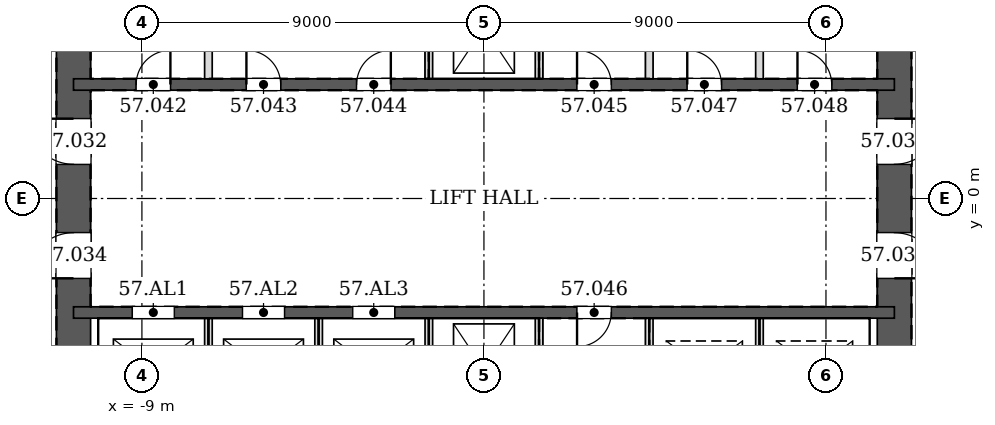
"""IFC4 building model, lengths in metres.
Left out: names, types, materials, properties, quantities, classifications, styles, units other than length and angle.
Written with IfcOpenShell. Run it as: python <this file> out.ifc"""

import sys

from ifc_helpers import new_model, si_unit, direction, frame, frame_2d, origin, place, context, subcontext, project, spatial, rectangle, extrude, element, fill, save


model = new_model("IFC4")
c1 = context("Model", 3, precision=1e-05, world=origin(), true_north=direction((0.0, 1.0)))
c2 = subcontext(c1, "Body", "Model", "MODEL_VIEW")
j1 = project(units=[si_unit("LENGTHUNIT", "METRE"), si_unit("PLANEANGLEUNIT", "RADIAN")], contexts=[c1])
p1 = place(None, origin())
s1 = spatial("IfcSite", under=j1, at=p1, CompositionType="ELEMENT")
p2 = place(p1, origin())
s2 = spatial("IfcBuilding", under=s1, at=p2, CompositionType="ELEMENT")
p3 = place(p2, frame((0.0, 0.0, 241.4)))
s3 = spatial("IfcBuildingStorey", under=s2, at=p3, CompositionType="ELEMENT", Elevation=241.4)
p4 = place(p3, frame((10.8, -10.8, 0.0), z_axis=(0.0, 0.0, 1.0), x_axis=(0.0, 1.0, 0.0)))
e1 = element("IfcWall", 1, at=p4, inside=s3, PredefinedType="SOLIDWALL", context=c2, shape_type="SweptSolid", body=[
    extrude(rectangle(XDim=21.6, YDim=0.9, at=frame_2d((10.8, 0.0))), origin(), (0.0, 0.0, 1.0), 3.4),
])
p5 = place(p4, frame((11.7, 0.0, 0.0)))
e2 = element("IfcOpeningElement", 2, at=p5, cuts=e1, PredefinedType="OPENING", context=c2, shape_type="SweptSolid", body=[
    extrude(rectangle(XDim=1.2, YDim=2.1, at=frame_2d((0.6, 1.05))), frame((0.0, 0.46, 0.0), z_axis=(0.0, -1.0, 0.0), x_axis=(1.0, 0.0, 0.0)), (0.0, 0.0, 1.0), 0.92),
])
p6 = place(p4, frame((8.7, 0.0, 0.0)))
e3 = element("IfcOpeningElement", 3, at=p6, cuts=e1, PredefinedType="OPENING", context=c2, shape_type="SweptSolid", body=[
    extrude(rectangle(XDim=1.2, YDim=2.1, at=frame_2d((0.6, 1.05))), frame((0.0, 0.46, 0.0), z_axis=(0.0, -1.0, 0.0), x_axis=(1.0, 0.0, 0.0)), (0.0, 0.0, 1.0), 0.92),
])
p7 = place(p3, frame((-10.8, 10.8, 0.0), z_axis=(0.0, 0.0, 1.0), x_axis=(0.0, -1.0, 0.0)))
e4 = element("IfcWall", 4, at=p7, inside=s3, PredefinedType="SOLIDWALL", context=c2, shape_type="SweptSolid", body=[
    extrude(rectangle(XDim=21.6, YDim=0.9, at=frame_2d((10.8, 0.0))), origin(), (0.0, 0.0, 1.0), 3.4),
])
p8 = place(p7, frame((8.7, 0.0, 0.0)))
e5 = element("IfcOpeningElement", 5, at=p8, cuts=e4, PredefinedType="OPENING", context=c2, shape_type="SweptSolid", body=[
    extrude(rectangle(XDim=1.2, YDim=2.1, at=frame_2d((0.6, 1.05))), frame((0.0, 0.46, 0.0), z_axis=(0.0, -1.0, 0.0), x_axis=(1.0, 0.0, 0.0)), (0.0, 0.0, 1.0), 0.92),
])
p9 = place(p7, frame((11.7, 0.0, 0.0)))
e6 = element("IfcOpeningElement", 6, at=p9, cuts=e4, PredefinedType="OPENING", context=c2, shape_type="SweptSolid", body=[
    extrude(rectangle(XDim=1.2, YDim=2.1, at=frame_2d((0.6, 1.05))), frame((0.0, 0.46, 0.0), z_axis=(0.0, -1.0, 0.0), x_axis=(1.0, 0.0, 0.0)), (0.0, 0.0, 1.0), 0.92),
])
p10 = place(p3, frame((-10.8, 3.0, 0.0), z_axis=(0.0, 0.0, 1.0), x_axis=(1.0, 0.0, 0.0)))
e7 = element("IfcWall", 7, at=p10, inside=s3, PredefinedType="SOLIDWALL", context=c2, shape_type="SweptSolid", body=[
    extrude(rectangle(XDim=21.6, YDim=0.3, at=frame_2d((10.8, 0.0))), origin(), (0.0, 0.0, 1.0), 3.4),
])
p11 = place(p10, frame((1.65, 0.0, 0.0)))
e8 = element("IfcOpeningElement", 8, at=p11, cuts=e7, PredefinedType="OPENING", context=c2, shape_type="SweptSolid", body=[
    extrude(rectangle(XDim=0.9, YDim=2.1, at=frame_2d((0.45, 1.05))), frame((0.0, 0.16, 0.0), z_axis=(0.0, -1.0, 0.0), x_axis=(1.0, 0.0, 0.0)), (0.0, 0.0, 1.0), 0.32),
])
p12 = place(p10, frame((4.55, 0.0, 0.0)))
e9 = element("IfcOpeningElement", 9, at=p12, cuts=e7, PredefinedType="OPENING", context=c2, shape_type="SweptSolid", body=[
    extrude(rectangle(XDim=0.9, YDim=2.1, at=frame_2d((0.45, 1.05))), frame((0.0, 0.16, 0.0), z_axis=(0.0, -1.0, 0.0), x_axis=(1.0, 0.0, 0.0)), (0.0, 0.0, 1.0), 0.32),
])
p13 = place(p10, frame((7.45, 0.0, 0.0)))
e10 = element("IfcOpeningElement", 10, at=p13, cuts=e7, PredefinedType="OPENING", context=c2, shape_type="SweptSolid", body=[
    extrude(rectangle(XDim=0.9, YDim=2.1, at=frame_2d((0.45, 1.05))), frame((0.0, 0.16, 0.0), z_axis=(0.0, -1.0, 0.0), x_axis=(1.0, 0.0, 0.0)), (0.0, 0.0, 1.0), 0.32),
])
p14 = place(p10, frame((13.25, 0.0, 0.0)))
e11 = element("IfcOpeningElement", 11, at=p14, cuts=e7, PredefinedType="OPENING", context=c2, shape_type="SweptSolid", body=[
    extrude(rectangle(XDim=0.9, YDim=2.1, at=frame_2d((0.45, 1.05))), frame((0.0, 0.16, 0.0), z_axis=(0.0, -1.0, 0.0), x_axis=(1.0, 0.0, 0.0)), (0.0, 0.0, 1.0), 0.32),
])
p15 = place(p10, frame((16.15, 0.0, 0.0)))
e12 = element("IfcOpeningElement", 12, at=p15, cuts=e7, PredefinedType="OPENING", context=c2, shape_type="SweptSolid", body=[
    extrude(rectangle(XDim=0.9, YDim=2.1, at=frame_2d((0.45, 1.05))), frame((0.0, 0.16, 0.0), z_axis=(0.0, -1.0, 0.0), x_axis=(1.0, 0.0, 0.0)), (0.0, 0.0, 1.0), 0.32),
])
p16 = place(p10, frame((19.05, 0.0, 0.0)))
e13 = element("IfcOpeningElement", 13, at=p16, cuts=e7, PredefinedType="OPENING", context=c2, shape_type="SweptSolid", body=[
    extrude(rectangle(XDim=0.9, YDim=2.1, at=frame_2d((0.45, 1.05))), frame((0.0, 0.16, 0.0), z_axis=(0.0, -1.0, 0.0), x_axis=(1.0, 0.0, 0.0)), (0.0, 0.0, 1.0), 0.32),
])
p17 = place(p3, frame((-10.8, -3.0, 0.0), z_axis=(0.0, 0.0, 1.0), x_axis=(1.0, 0.0, 0.0)))
e14 = element("IfcWall", 14, at=p17, inside=s3, PredefinedType="SOLIDWALL", context=c2, shape_type="SweptSolid", body=[
    extrude(rectangle(XDim=21.6, YDim=0.3, at=frame_2d((10.8, 0.0))), origin(), (0.0, 0.0, 1.0), 3.4),
])
p18 = place(p17, frame((13.25, 0.0, 0.0)))
e15 = element("IfcOpeningElement", 15, at=p18, cuts=e14, PredefinedType="OPENING", context=c2, shape_type="SweptSolid", body=[
    extrude(rectangle(XDim=0.9, YDim=2.1, at=frame_2d((0.45, 1.05))), frame((0.0, 0.16, 0.0), z_axis=(0.0, -1.0, 0.0), x_axis=(1.0, 0.0, 0.0)), (0.0, 0.0, 1.0), 0.32),
])
p19 = place(p17, frame((1.55, 0.0, 0.0)))
e16 = element("IfcOpeningElement", 16, at=p19, cuts=e14, PredefinedType="OPENING", context=c2, shape_type="SweptSolid", body=[
    extrude(rectangle(XDim=1.1, YDim=2.1, at=frame_2d((0.55, 1.05))), frame((0.0, 0.16, 0.0), z_axis=(0.0, -1.0, 0.0), x_axis=(1.0, 0.0, 0.0)), (0.0, 0.0, 1.0), 0.32),
])
p20 = place(p17, frame((4.45, 0.0, 0.0)))
e17 = element("IfcOpeningElement", 17, at=p20, cuts=e14, PredefinedType="OPENING", context=c2, shape_type="SweptSolid", body=[
    extrude(rectangle(XDim=1.1, YDim=2.1, at=frame_2d((0.55, 1.05))), frame((0.0, 0.16, 0.0), z_axis=(0.0, -1.0, 0.0), x_axis=(1.0, 0.0, 0.0)), (0.0, 0.0, 1.0), 0.32),
])
p21 = place(p17, frame((7.35, 0.0, 0.0)))
e18 = element("IfcOpeningElement", 18, at=p21, cuts=e14, PredefinedType="OPENING", context=c2, shape_type="SweptSolid", body=[
    extrude(rectangle(XDim=1.1, YDim=2.1, at=frame_2d((0.55, 1.05))), frame((0.0, 0.16, 0.0), z_axis=(0.0, -1.0, 0.0), x_axis=(1.0, 0.0, 0.0)), (0.0, 0.0, 1.0), 0.32),
])
for number, where, z_axis, x_axis in (
    (19, (-7.25, 3.15, 0.0), (0.0, 0.0, 1.0), (0.0, 1.0, 0.0)),
    (20, (-1.45, 3.15, 0.0), (0.0, 0.0, 1.0), (0.0, 1.0, 0.0)),
    (21, (1.45, 3.15, 0.0), (0.0, 0.0, 1.0), (0.0, 1.0, 0.0)),
    (22, (4.35, 3.15, 0.0), (0.0, 0.0, 1.0), (0.0, 1.0, 0.0)),
    (23, (7.25, 3.15, 0.0), (0.0, 0.0, 1.0), (0.0, 1.0, 0.0)),
):
    element("IfcWall", number, at=place(p3, frame(where, z_axis=z_axis, x_axis=x_axis)), inside=s3, PredefinedType="PARTITIONING", context=c2, shape_type="SweptSolid", body=[
        extrude(rectangle(XDim=2.7, YDim=0.2, at=frame_2d((1.35, 0.0))), origin(), (0.0, 0.0, 1.0), 3.2),
    ])
for number, where, z_axis, x_axis in (
    (24, (-7.25, -5.85, 0.0), (0.0, 0.0, 1.0), (0.0, 1.0, 0.0)),
    (25, (-4.35, -5.85, 0.0), (0.0, 0.0, 1.0), (0.0, 1.0, 0.0)),
    (26, (-1.45, -5.85, 0.0), (0.0, 0.0, 1.0), (0.0, 1.0, 0.0)),
):
    element("IfcWall", number, at=place(p3, frame(where, z_axis=z_axis, x_axis=x_axis)), inside=s3, PredefinedType="PARTITIONING", context=c2, shape_type="SweptSolid", body=[
        extrude(rectangle(XDim=2.7, YDim=0.2, at=frame_2d((1.35, 0.0))), origin(), (0.0, 0.0, 1.0), 3.4),
    ])
for number, where, z_axis, x_axis in (
    (27, (1.45, -5.85, 0.0), (0.0, 0.0, 1.0), (0.0, 1.0, 0.0)),
    (28, (4.35, -5.85, 0.0), (0.0, 0.0, 1.0), (0.0, 1.0, 0.0)),
):
    element("IfcWall", number, at=place(p3, frame(where, z_axis=z_axis, x_axis=x_axis)), inside=s3, PredefinedType="PARTITIONING", context=c2, shape_type="SweptSolid", body=[
        extrude(rectangle(XDim=2.7, YDim=0.2, at=frame_2d((1.35, 0.0))), origin(), (0.0, 0.0, 1.0), 3.2),
    ])
p22 = place(p3, frame((7.25, -5.85, 0.0), z_axis=(0.0, 0.0, 1.0), x_axis=(0.0, 1.0, 0.0)))
e29 = element("IfcWall", 29, at=p22, inside=s3, PredefinedType="PARTITIONING", context=c2, shape_type="SweptSolid", body=[
    extrude(rectangle(XDim=2.7, YDim=0.2, at=frame_2d((1.35, 0.0))), origin(), (0.0, 0.0, 1.0), 3.4),
])
p23 = place(p5, frame((1.2, 0.0, 0.0), z_axis=(0.0, 0.0, 1.0), x_axis=(-1.0, 0.0, 0.0)))
e30 = element("IfcDoor", 30, at=p23, inside=s3, OperationType="SINGLE_SWING_LEFT", PredefinedType="DOOR", context=c2, shape_type="SweptSolid", body=[
    extrude(rectangle(XDim=1.2, YDim=2.1, at=frame_2d((0.6, 1.05))), frame((0.0, 0.025, 0.0), z_axis=(0.0, -1.0, 0.0), x_axis=(1.0, 0.0, 0.0)), (0.0, 0.0, 1.0), 0.05),
])
fill(e2, e30)
p24 = place(p8, frame((1.2, 0.0, 0.0), z_axis=(0.0, 0.0, 1.0), x_axis=(-1.0, 0.0, 0.0)))
e31 = element("IfcDoor", 31, at=p24, inside=s3, OperationType="SINGLE_SWING_RIGHT", PredefinedType="DOOR", context=c2, shape_type="SweptSolid", body=[
    extrude(rectangle(XDim=1.2, YDim=2.1, at=frame_2d((0.6, 1.05))), frame((0.0, 0.025, 0.0), z_axis=(0.0, -1.0, 0.0), x_axis=(1.0, 0.0, 0.0)), (0.0, 0.0, 1.0), 0.05),
])
fill(e5, e31)
p25 = place(p6, frame((1.2, 0.0, 0.0), z_axis=(0.0, 0.0, 1.0), x_axis=(-1.0, 0.0, 0.0)))
e32 = element("IfcDoor", 32, at=p25, inside=s3, OperationType="SINGLE_SWING_RIGHT", PredefinedType="DOOR", context=c2, shape_type="SweptSolid", body=[
    extrude(rectangle(XDim=1.2, YDim=2.1, at=frame_2d((0.6, 1.05))), frame((0.0, 0.025, 0.0), z_axis=(0.0, -1.0, 0.0), x_axis=(1.0, 0.0, 0.0)), (0.0, 0.0, 1.0), 0.05),
])
fill(e3, e32)
p26 = place(p9, frame((1.2, 0.0, 0.0), z_axis=(0.0, 0.0, 1.0), x_axis=(-1.0, 0.0, 0.0)))
e33 = element("IfcDoor", 33, at=p26, inside=s3, OperationType="SINGLE_SWING_LEFT", PredefinedType="DOOR", context=c2, shape_type="SweptSolid", body=[
    extrude(rectangle(XDim=1.2, YDim=2.1, at=frame_2d((0.6, 1.05))), frame((0.0, 0.025, 0.0), z_axis=(0.0, -1.0, 0.0), x_axis=(1.0, 0.0, 0.0)), (0.0, 0.0, 1.0), 0.05),
])
fill(e6, e33)
p27 = place(p11, origin())
e34 = element("IfcDoor", 34, at=p27, inside=s3, OperationType="SINGLE_SWING_RIGHT", PredefinedType="DOOR", context=c2, shape_type="SweptSolid", body=[
    extrude(rectangle(XDim=0.9, YDim=2.1, at=frame_2d((0.45, 1.05))), frame((0.0, 0.025, 0.0), z_axis=(0.0, -1.0, 0.0), x_axis=(1.0, 0.0, 0.0)), (0.0, 0.0, 1.0), 0.05),
])
fill(e8, e34)
p28 = place(p12, origin())
e35 = element("IfcDoor", 35, at=p28, inside=s3, OperationType="SINGLE_SWING_LEFT", PredefinedType="DOOR", context=c2, shape_type="SweptSolid", body=[
    extrude(rectangle(XDim=0.9, YDim=2.1, at=frame_2d((0.45, 1.05))), frame((0.0, 0.025, 0.0), z_axis=(0.0, -1.0, 0.0), x_axis=(1.0, 0.0, 0.0)), (0.0, 0.0, 1.0), 0.05),
])
fill(e9, e35)
p29 = place(p13, origin())
e36 = element("IfcDoor", 36, at=p29, inside=s3, OperationType="SINGLE_SWING_RIGHT", PredefinedType="DOOR", context=c2, shape_type="SweptSolid", body=[
    extrude(rectangle(XDim=0.9, YDim=2.1, at=frame_2d((0.45, 1.05))), frame((0.0, 0.025, 0.0), z_axis=(0.0, -1.0, 0.0), x_axis=(1.0, 0.0, 0.0)), (0.0, 0.0, 1.0), 0.05),
])
fill(e10, e36)
p30 = place(p14, origin())
e37 = element("IfcDoor", 37, at=p30, inside=s3, OperationType="SINGLE_SWING_LEFT", PredefinedType="DOOR", context=c2, shape_type="SweptSolid", body=[
    extrude(rectangle(XDim=0.9, YDim=2.1, at=frame_2d((0.45, 1.05))), frame((0.0, 0.025, 0.0), z_axis=(0.0, -1.0, 0.0), x_axis=(1.0, 0.0, 0.0)), (0.0, 0.0, 1.0), 0.05),
])
fill(e11, e37)
p31 = place(p18, frame((0.9, 0.0, 0.0), z_axis=(0.0, 0.0, 1.0), x_axis=(-1.0, 0.0, 0.0)))
e38 = element("IfcDoor", 38, at=p31, inside=s3, OperationType="SINGLE_SWING_RIGHT", PredefinedType="DOOR", context=c2, shape_type="SweptSolid", body=[
    extrude(rectangle(XDim=0.9, YDim=2.1, at=frame_2d((0.45, 1.05))), frame((0.0, 0.025, 0.0), z_axis=(0.0, -1.0, 0.0), x_axis=(1.0, 0.0, 0.0)), (0.0, 0.0, 1.0), 0.05),
])
fill(e15, e38)
p32 = place(p15, origin())
e39 = element("IfcDoor", 39, at=p32, inside=s3, OperationType="SINGLE_SWING_LEFT", PredefinedType="DOOR", context=c2, shape_type="SweptSolid", body=[
    extrude(rectangle(XDim=0.9, YDim=2.1, at=frame_2d((0.45, 1.05))), frame((0.0, 0.025, 0.0), z_axis=(0.0, -1.0, 0.0), x_axis=(1.0, 0.0, 0.0)), (0.0, 0.0, 1.0), 0.05),
])
fill(e12, e39)
p33 = place(p16, origin())
e40 = element("IfcDoor", 40, at=p33, inside=s3, OperationType="SINGLE_SWING_LEFT", PredefinedType="DOOR", context=c2, shape_type="SweptSolid", body=[
    extrude(rectangle(XDim=0.9, YDim=2.1, at=frame_2d((0.45, 1.05))), frame((0.0, 0.025, 0.0), z_axis=(0.0, -1.0, 0.0), x_axis=(1.0, 0.0, 0.0)), (0.0, 0.0, 1.0), 0.05),
])
fill(e13, e40)
p34 = place(p19, origin())
e41 = element("IfcDoor", 41, at=p34, inside=s3, OperationType="DOUBLE_DOOR_SLIDING", PredefinedType="DOOR", context=c2, shape_type="SweptSolid", body=[
    extrude(rectangle(XDim=1.1, YDim=2.1, at=frame_2d((0.55, 1.05))), frame((0.0, 0.025, 0.0), z_axis=(0.0, -1.0, 0.0), x_axis=(1.0, 0.0, 0.0)), (0.0, 0.0, 1.0), 0.05),
])
fill(e16, e41)
p35 = place(p20, origin())
e42 = element("IfcDoor", 42, at=p35, inside=s3, OperationType="DOUBLE_DOOR_SLIDING", PredefinedType="DOOR", context=c2, shape_type="SweptSolid", body=[
    extrude(rectangle(XDim=1.1, YDim=2.1, at=frame_2d((0.55, 1.05))), frame((0.0, 0.025, 0.0), z_axis=(0.0, -1.0, 0.0), x_axis=(1.0, 0.0, 0.0)), (0.0, 0.0, 1.0), 0.05),
])
fill(e17, e42)
p36 = place(p21, origin())
e43 = element("IfcDoor", 43, at=p36, inside=s3, OperationType="DOUBLE_DOOR_SLIDING", PredefinedType="DOOR", context=c2, shape_type="SweptSolid", body=[
    extrude(rectangle(XDim=1.1, YDim=2.1, at=frame_2d((0.55, 1.05))), frame((0.0, 0.025, 0.0), z_axis=(0.0, -1.0, 0.0), x_axis=(1.0, 0.0, 0.0)), (0.0, 0.0, 1.0), 0.05),
])
fill(e18, e43)
save(model, sys.argv[1])
